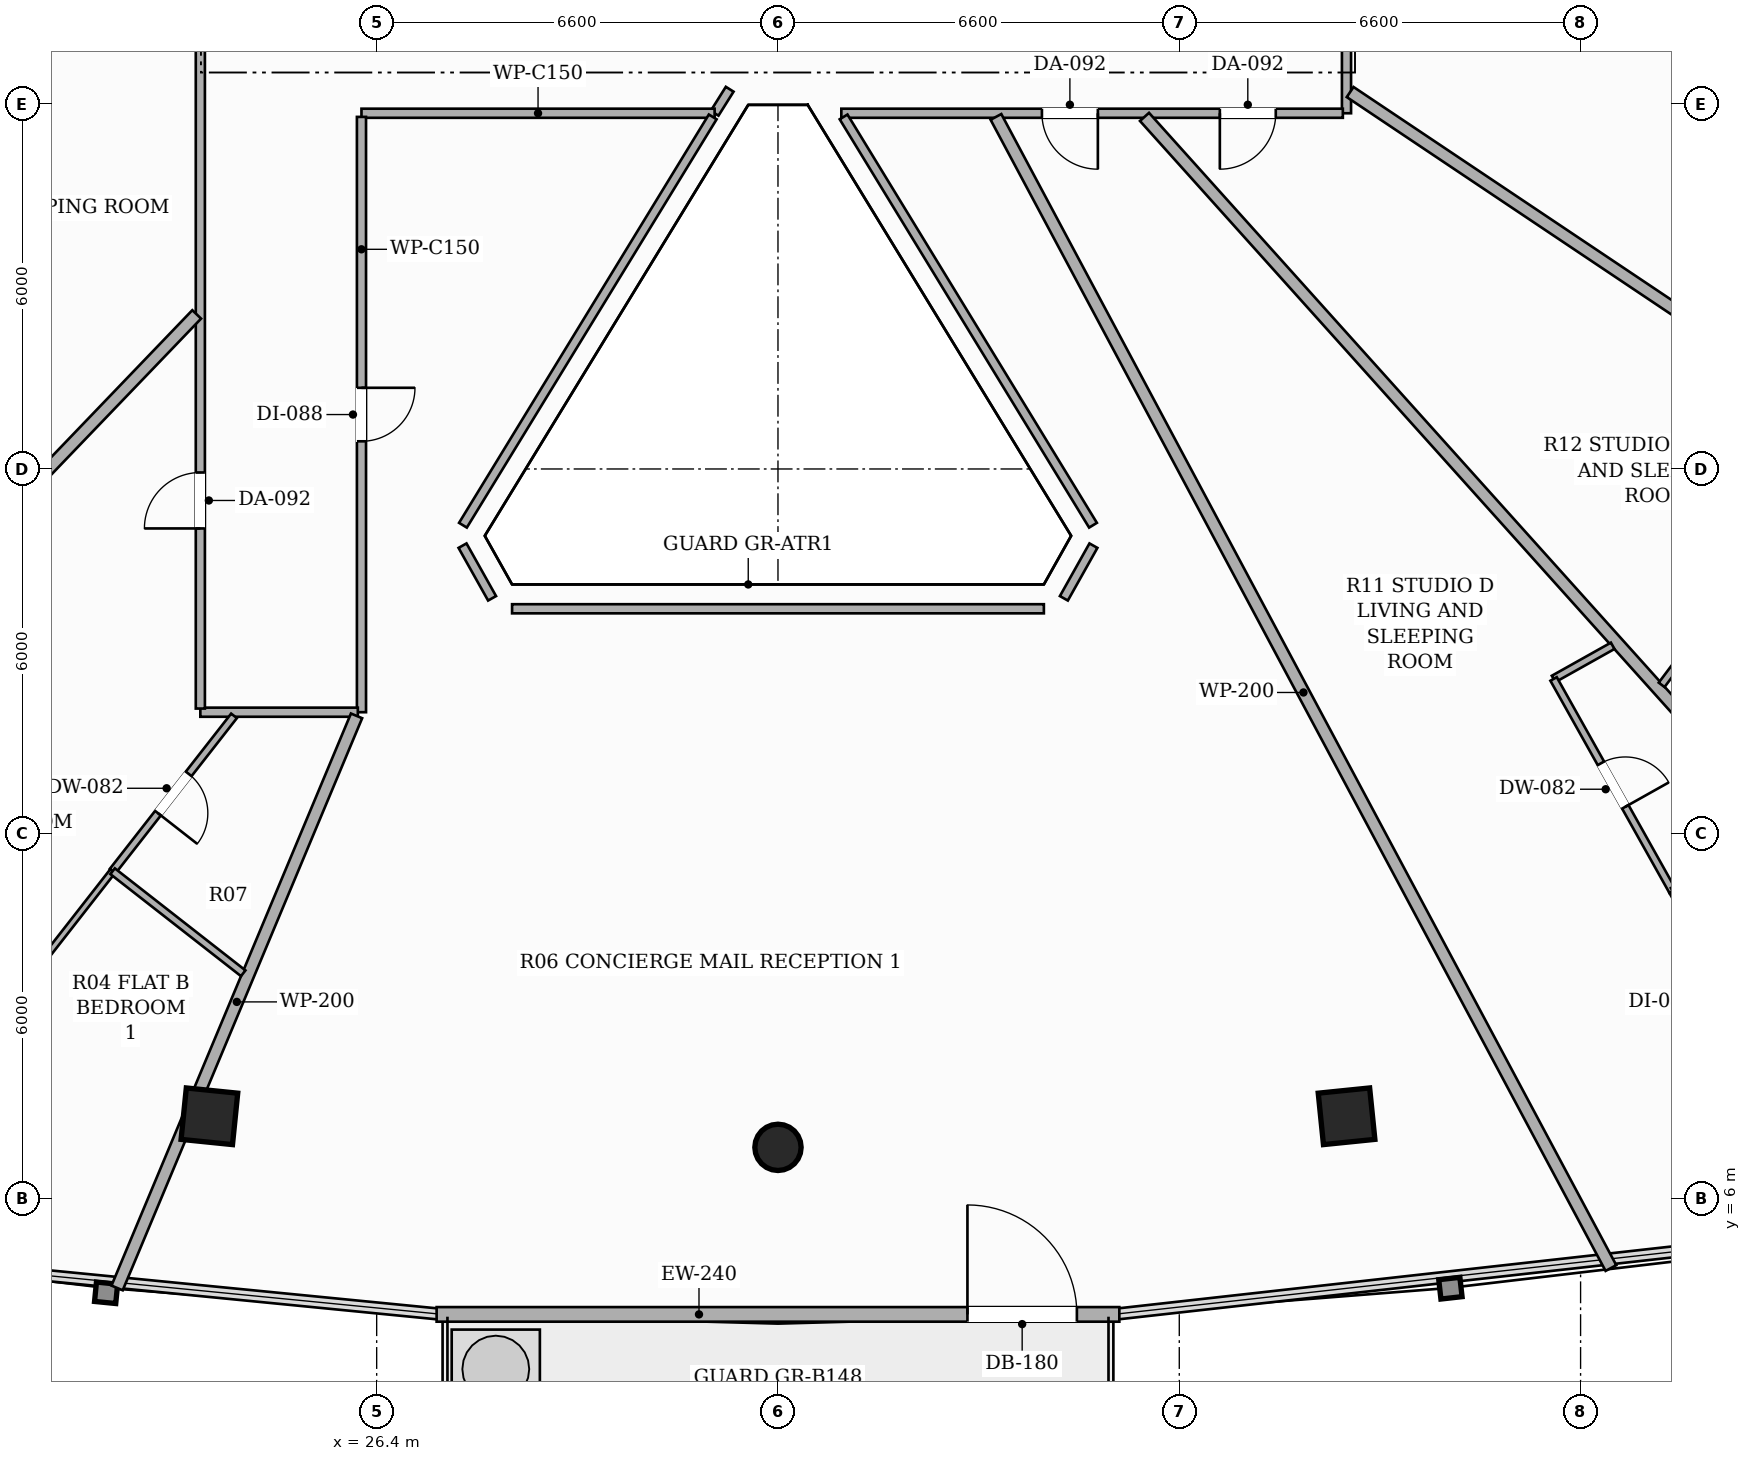
"""IFC4 building model, lengths in metres.
Left out: names, types, materials, properties, quantities, classifications, styles, units other than length and angle.
Written with IfcOpenShell. Run it as: python <this file> out.ifc"""

import sys

from ifc_helpers import new_model, si_unit, direction, frame, frame_2d, origin, origin_2d, place, context, subcontext, project, spatial, rectangle, hollow_rectangle, hollow_circle, extrude, element, fill, save


model = new_model("IFC4")
c1 = context("Model", 3, precision=1e-05, world=origin(), true_north=direction((0.0, 1.0)))
c2 = subcontext(c1, "Body", "Model", "MODEL_VIEW")
j1 = project(units=[si_unit("LENGTHUNIT", "METRE"), si_unit("PLANEANGLEUNIT", "RADIAN")], contexts=[c1])
p1 = place(None, origin())
s1 = spatial("IfcSite", under=j1, at=p1, CompositionType="ELEMENT")
p2 = place(p1, origin())
s2 = spatial("IfcBuilding", under=s1, at=p2, CompositionType="ELEMENT")
p3 = place(p2, frame((0.0, 0.0, 180.35)))
s3 = spatial("IfcBuildingStorey", under=s2, at=p3, CompositionType="ELEMENT", Elevation=180.35)
p4 = place(p3, frame((23.649, 7.355, 0.0), z_axis=(0.0, 0.0, 1.0), x_axis=(-0.994880708829, 0.101056297183, 0.0)))
e1 = element("IfcColumn", 1, at=p4, inside=s3, PredefinedType="COLUMN", context=c2, shape_type="SweptSolid", body=[
    extrude(hollow_rectangle(XDim=0.85, YDim=0.85, WallThickness=0.028, at=origin_2d()), origin(), (0.0, 0.0, 1.0), 3.3),
])
p5 = place(p3, frame((33.0, 6.844, 0.0), z_axis=(0.0, 0.0, 1.0), x_axis=(1.0, 0.0, 0.0)))
e2 = element("IfcColumn", 2, at=p5, inside=s3, PredefinedType="COLUMN", context=c2, shape_type="SweptSolid", body=[
    extrude(hollow_circle(Radius=0.381, WallThickness=0.022, at=origin_2d()), origin(), (0.0, 0.0, 1.0), 3.3),
])
p6 = place(p3, frame((42.351, 7.355, 0.0), z_axis=(0.0, 0.0, 1.0), x_axis=(0.994880708829, 0.101056297183, 0.0)))
e3 = element("IfcColumn", 3, at=p6, inside=s3, PredefinedType="COLUMN", context=c2, shape_type="SweptSolid", body=[
    extrude(hollow_rectangle(XDim=0.85, YDim=0.85, WallThickness=0.028, at=origin_2d()), origin(), (0.0, 0.0, 1.0), 3.3),
])
p7 = place(p3, frame((27.386, 4.097, 0.0), z_axis=(0.0, 0.0, 1.0), x_axis=(1.0, 0.0, 0.0)))
e4 = element("IfcWall", 4, at=p7, inside=s3, PredefinedType="SOLIDWALL", context=c2, shape_type="SweptSolid", body=[
    extrude(rectangle(XDim=11.228, YDim=0.24, at=frame_2d((5.614, 0.0))), origin(), (0.0, 0.0, 1.0), 2.624),
])
p8 = place(p7, frame((8.73, 0.0, 0.0)))
e5 = element("IfcOpeningElement", 5, at=p8, cuts=e4, PredefinedType="OPENING", context=c2, shape_type="SweptSolid", body=[
    extrude(rectangle(XDim=1.8, YDim=2.2, at=frame_2d((0.9, 1.1))), frame((0.0, 0.13, 0.0), z_axis=(0.0, -1.0, 0.0), x_axis=(1.0, 0.0, 0.0)), (0.0, 0.0, 1.0), 0.26),
])
p9 = place(p3, frame((50.652, 24.373, 0.0), z_axis=(0.0, 0.0, 1.0), x_axis=(-0.514290689074, 0.857615932182, 0.0)))
e6 = element("IfcWall", 6, at=p9, inside=s3, PredefinedType="SOLIDWALL", context=c2, shape_type="SweptSolid", body=[
    extrude(rectangle(XDim=10.856, YDim=0.24, at=frame_2d((5.428, 0.0))), origin(), (0.0, 0.0, 1.0), 2.624),
])
p10 = place(p9, frame((8.358, 0.0, 0.0)))
e7 = element("IfcOpeningElement", 7, at=p10, cuts=e6, PredefinedType="OPENING", context=c2, shape_type="SweptSolid", body=[
    extrude(rectangle(XDim=1.8, YDim=2.2, at=frame_2d((0.9, 1.1))), frame((0.0, 0.13, 0.0), z_axis=(0.0, -1.0, 0.0), x_axis=(1.0, 0.0, 0.0)), (0.0, 0.0, 1.0), 0.26),
])
p11 = place(p3, frame((32.206, 24.245, 0.0), z_axis=(0.0, 0.0, 1.0), x_axis=(-0.531785592992, -0.84687902506, 0.0)))
e8 = element("IfcWall", 8, at=p11, inside=s3, PredefinedType="PARTITIONING", context=c2, shape_type="SweptSolid", body=[
    extrude(rectangle(XDim=0.467, YDim=0.15, at=frame_2d((0.233, 0.0))), origin(), (0.0, 0.0, 1.0), 3.06),
])
p12 = place(p3, frame((31.958, 23.85, 0.0), z_axis=(0.0, 0.0, 1.0), x_axis=(-1.0, 0.0, 0.0)))
e9 = element("IfcWall", 9, at=p12, inside=s3, PredefinedType="PARTITIONING", context=c2, shape_type="SweptSolid", body=[
    extrude(rectangle(XDim=5.808, YDim=0.15, at=frame_2d((2.904, 0.0))), origin(), (0.0, 0.0, 1.0), 2.721),
])
p13 = place(p3, frame((26.15, 23.79, 0.0), z_axis=(0.0, 0.0, 1.0), x_axis=(0.0, -1.0, 0.0)))
e10 = element("IfcWall", 10, at=p13, inside=s3, PredefinedType="PARTITIONING", context=c2, shape_type="SweptSolid", body=[
    extrude(rectangle(XDim=9.79, YDim=0.15, at=frame_2d((4.895, 0.0))), origin(), (0.0, 0.0, 1.0), 2.721),
])
p14 = place(p13, frame((4.455, 0.0, 0.0)))
e11 = element("IfcOpeningElement", 11, at=p14, cuts=e10, PredefinedType="OPENING", context=c2, shape_type="SweptSolid", body=[
    extrude(rectangle(XDim=0.88, YDim=2.1, at=frame_2d((0.44, 1.05))), frame((0.0, 0.085, 0.0), z_axis=(0.0, -1.0, 0.0), x_axis=(1.0, 0.0, 0.0)), (0.0, 0.0, 1.0), 0.17),
])
p15 = place(p3, frame((26.09, 14.0, 0.0), z_axis=(0.0, 0.0, 1.0), x_axis=(-1.0, 0.0, 0.0)))
e12 = element("IfcWall", 12, at=p15, inside=s3, PredefinedType="PARTITIONING", context=c2, shape_type="SweptSolid", body=[
    extrude(rectangle(XDim=2.59, YDim=0.15, at=frame_2d((1.295, 0.0))), origin(), (0.0, 0.0, 1.0), 2.721),
])
p16 = place(p3, frame((23.5, 14.06, 0.0), z_axis=(0.0, 0.0, 1.0), x_axis=(0.0, 1.0, 0.0)))
e13 = element("IfcWall", 13, at=p16, inside=s3, PredefinedType="PARTITIONING", context=c2, shape_type="SweptSolid", body=[
    extrude(rectangle(XDim=23.181, YDim=0.15, at=frame_2d((11.59, 0.0))), origin(), (0.0, 0.0, 1.0), 2.413),
])
p17 = place(p16, frame((14.184, 0.0, 0.0)))
e14 = element("IfcOpeningElement", 14, at=p17, cuts=e13, PredefinedType="OPENING", context=c2, shape_type="SweptSolid", body=[
    extrude(rectangle(XDim=0.92, YDim=2.15, at=frame_2d((0.46, 1.075))), frame((0.0, 0.085, 0.0), z_axis=(0.0, -1.0, 0.0), x_axis=(1.0, 0.0, 0.0)), (0.0, 0.0, 1.0), 0.17),
])
p18 = place(p16, frame((2.962, 0.0, 0.0)))
e15 = element("IfcOpeningElement", 15, at=p18, cuts=e13, PredefinedType="OPENING", context=c2, shape_type="SweptSolid", body=[
    extrude(rectangle(XDim=0.92, YDim=2.15, at=frame_2d((0.46, 1.075))), frame((0.0, 0.085, 0.0), z_axis=(0.0, -1.0, 0.0), x_axis=(1.0, 0.0, 0.0)), (0.0, 0.0, 1.0), 0.17),
])
p19 = place(p3, frame((42.35, 28.34, 0.0), z_axis=(0.0, 0.0, 1.0), x_axis=(0.0, -1.0, 0.0)))
e16 = element("IfcWall", 16, at=p19, inside=s3, PredefinedType="PARTITIONING", context=c2, shape_type="SweptSolid", body=[
    extrude(rectangle(XDim=4.49, YDim=0.15, at=frame_2d((2.245, 0.0))), origin(), (0.0, 0.0, 1.0), 2.721),
])
p20 = place(p19, frame((1.783, 0.0, 0.0)))
e17 = element("IfcOpeningElement", 17, at=p20, cuts=e16, PredefinedType="OPENING", context=c2, shape_type="SweptSolid", body=[
    extrude(rectangle(XDim=0.88, YDim=2.1, at=frame_2d((0.44, 1.05))), frame((0.0, 0.085, 0.0), z_axis=(0.0, -1.0, 0.0), x_axis=(1.0, 0.0, 0.0)), (0.0, 0.0, 1.0), 0.17),
])
p21 = place(p3, frame((42.29, 23.85, 0.0), z_axis=(0.0, 0.0, 1.0), x_axis=(-1.0, 0.0, 0.0)))
e18 = element("IfcWall", 18, at=p21, inside=s3, PredefinedType="PARTITIONING", context=c2, shape_type="SweptSolid", body=[
    extrude(rectangle(XDim=8.248, YDim=0.15, at=frame_2d((4.124, 0.0))), origin(), (0.0, 0.0, 1.0), 2.492),
])
p22 = place(p21, frame((1.103, 0.0, 0.0)))
e19 = element("IfcOpeningElement", 19, at=p22, cuts=e18, PredefinedType="OPENING", context=c2, shape_type="SweptSolid", body=[
    extrude(rectangle(XDim=0.92, YDim=2.15, at=frame_2d((0.46, 1.075))), frame((0.0, 0.085, 0.0), z_axis=(0.0, -1.0, 0.0), x_axis=(1.0, 0.0, 0.0)), (0.0, 0.0, 1.0), 0.17),
])
p23 = place(p21, frame((4.029, 0.0, 0.0)))
e20 = element("IfcOpeningElement", 20, at=p23, cuts=e18, PredefinedType="OPENING", context=c2, shape_type="SweptSolid", body=[
    extrude(rectangle(XDim=0.92, YDim=2.15, at=frame_2d((0.46, 1.075))), frame((0.0, 0.085, 0.0), z_axis=(0.0, -1.0, 0.0), x_axis=(1.0, 0.0, 0.0)), (0.0, 0.0, 1.0), 0.17),
])
p24 = place(p3, frame((34.079, 23.79, 0.0), z_axis=(0.0, 0.0, 1.0), x_axis=(0.521278062647, -0.853386888465, 0.0)))
e21 = element("IfcWall", 21, at=p24, inside=s3, PredefinedType="PARTITIONING", context=c2, shape_type="SweptSolid", body=[
    extrude(rectangle(XDim=7.869, YDim=0.15, at=frame_2d((3.934, 0.0))), origin(), (0.0, 0.0, 1.0), 2.721),
])
p25 = place(p3, frame((38.188, 16.739, 0.0), z_axis=(0.0, 0.0, 1.0), x_axis=(-0.489479004575, -0.872015082485, 0.0)))
e22 = element("IfcWall", 22, at=p25, inside=s3, PredefinedType="PARTITIONING", context=c2, shape_type="SweptSolid", body=[
    extrude(rectangle(XDim=0.993, YDim=0.15, at=frame_2d((0.497, 0.0))), origin(), (0.0, 0.0, 1.0), 3.06),
])
p26 = place(p3, frame((37.373, 15.701, 0.0), z_axis=(0.0, 0.0, 1.0), x_axis=(-1.0, 0.0, 0.0)))
e23 = element("IfcWall", 23, at=p26, inside=s3, PredefinedType="PARTITIONING", context=c2, shape_type="SweptSolid", body=[
    extrude(rectangle(XDim=8.746, YDim=0.15, at=frame_2d((4.373, 0.0))), origin(), (0.0, 0.0, 1.0), 2.721),
])
p27 = place(p3, frame((28.298, 15.873, 0.0), z_axis=(0.0, 0.0, 1.0), x_axis=(-0.489479004575, 0.872015082485, 0.0)))
e24 = element("IfcWall", 24, at=p27, inside=s3, PredefinedType="PARTITIONING", context=c2, shape_type="SweptSolid", body=[
    extrude(rectangle(XDim=0.993, YDim=0.15, at=frame_2d((0.497, 0.0))), origin(), (0.0, 0.0, 1.0), 3.06),
])
p28 = place(p3, frame((27.819, 17.075, 0.0), z_axis=(0.0, 0.0, 1.0), x_axis=(0.52184261318, 0.853041785066, 0.0)))
e25 = element("IfcWall", 25, at=p28, inside=s3, PredefinedType="PARTITIONING", context=c2, shape_type="SweptSolid", body=[
    extrude(rectangle(XDim=7.872, YDim=0.15, at=frame_2d((3.936, 0.0))), origin(), (0.0, 0.0, 1.0), 2.721),
])
p29 = place(p3, frame((22.131, 4.532, 0.0), z_axis=(0.0, 0.0, 1.0), x_axis=(0.38611914038, 0.922448919687, 0.0)))
e26 = element("IfcWall", 26, at=p29, inside=s3, PredefinedType="PARTITIONING", context=c2, shape_type="SweptSolid", body=[
    extrude(rectangle(XDim=10.199, YDim=0.2, at=frame_2d((5.1, 0.0))), origin(), (0.0, 0.0, 1.0), 2.413),
])
p30 = place(p3, frame((36.585, 23.79, 0.0), z_axis=(0.0, 0.0, 1.0), x_axis=(0.47121923303, -0.88201611914, 0.0)))
e27 = element("IfcWall", 27, at=p30, inside=s3, PredefinedType="PARTITIONING", context=c2, shape_type="SweptSolid", body=[
    extrude(rectangle(XDim=21.463, YDim=0.2, at=frame_2d((10.732, 0.0))), origin(), (0.0, 0.0, 1.0), 2.413),
])
p31 = place(p3, frame((54.571, 16.055, 0.0), z_axis=(0.0, 0.0, 1.0), x_axis=(-0.830893680957, 0.556431209535, 0.0)))
e28 = element("IfcWall", 28, at=p31, inside=s3, PredefinedType="PARTITIONING", context=c2, shape_type="SweptSolid", body=[
    extrude(rectangle(XDim=14.636, YDim=0.2, at=frame_2d((7.318, 0.0))), origin(), (0.0, 0.0, 1.0), 2.413),
])
p32 = place(p3, frame((23.44, 20.542, 0.0), z_axis=(0.0, 0.0, 1.0), x_axis=(-0.692558302481, -0.721361904777, 0.0)))
e29 = element("IfcWall", 29, at=p32, inside=s3, PredefinedType="PARTITIONING", context=c2, shape_type="SweptSolid", body=[
    extrude(rectangle(XDim=19.58, YDim=0.2, at=frame_2d((9.79, 0.0))), origin(), (0.0, 0.0, 1.0), 2.413),
])
p33 = place(p3, frame((55.049, 5.957, 0.0), z_axis=(0.0, 0.0, 1.0), x_axis=(-0.668302779631, 0.743889369958, 0.0)))
e30 = element("IfcWall", 30, at=p33, inside=s3, PredefinedType="PARTITIONING", context=c2, shape_type="SweptSolid", body=[
    extrude(rectangle(XDim=23.973, YDim=0.2, at=frame_2d((11.986, 0.0))), origin(), (0.0, 0.0, 1.0), 2.413),
])
p34 = place(p3, frame((24.054, 13.94, 0.0), z_axis=(0.0, 0.0, 1.0), x_axis=(-0.615841255229, -0.787870261121, 0.0)))
e31 = element("IfcWall", 31, at=p34, inside=s3, PredefinedType="PARTITIONING", context=c2, shape_type="SweptSolid", body=[
    extrude(rectangle(XDim=3.243, YDim=0.12, at=frame_2d((1.622, 0.0))), origin(), (0.0, 0.0, 1.0), 2.721),
])
p35 = place(p34, frame((1.211, 0.0, 0.0)))
e32 = element("IfcOpeningElement", 32, at=p35, cuts=e31, PredefinedType="OPENING", context=c2, shape_type="SweptSolid", body=[
    extrude(rectangle(XDim=0.82, YDim=2.1, at=frame_2d((0.41, 1.05))), frame((0.0, 0.07, 0.0), z_axis=(0.0, -1.0, 0.0), x_axis=(1.0, 0.0, 0.0)), (0.0, 0.0, 1.0), 0.14),
])
p36 = place(p3, frame((22.057, 11.385, 0.0), z_axis=(0.0, 0.0, 1.0), x_axis=(-0.61561191154, -0.78804947457, 0.0)))
e33 = element("IfcWall", 33, at=p36, inside=s3, PredefinedType="PARTITIONING", context=c2, shape_type="SweptSolid", body=[
    extrude(rectangle(XDim=7.963, YDim=0.1, at=frame_2d((3.981, 0.0))), origin(), (0.0, 0.0, 1.0), 2.413),
])
p37 = place(p36, frame((3.541, 0.0, 0.0)))
e34 = element("IfcOpeningElement", 34, at=p37, cuts=e33, PredefinedType="OPENING", context=c2, shape_type="SweptSolid", body=[
    extrude(rectangle(XDim=0.88, YDim=2.1, at=frame_2d((0.44, 1.05))), frame((0.0, 0.06, 0.0), z_axis=(0.0, -1.0, 0.0), x_axis=(1.0, 0.0, 0.0)), (0.0, 0.0, 1.0), 0.12),
])
p38 = place(p3, frame((24.205, 9.707, 0.0), z_axis=(0.0, 0.0, 1.0), x_axis=(-0.788077327334, 0.615576255343, 0.0)))
e35 = element("IfcWall", 35, at=p38, inside=s3, PredefinedType="PARTITIONING", context=c2, shape_type="SweptSolid", body=[
    extrude(rectangle(XDim=2.726, YDim=0.12, at=frame_2d((1.363, 0.0))), origin(), (0.0, 0.0, 1.0), 2.721),
])
p39 = place(p3, frame((48.562, 15.819, 0.0), z_axis=(0.0, 0.0, 1.0), x_axis=(-0.600820734403, -0.799383790874, 0.0)))
e36 = element("IfcWall", 36, at=p39, inside=s3, PredefinedType="PARTITIONING", context=c2, shape_type="SweptSolid", body=[
    extrude(rectangle(XDim=1.713, YDim=0.12, at=frame_2d((0.856, 0.0))), origin(), (0.0, 0.0, 1.0), 2.492),
])
p40 = place(p3, frame((46.728, 15.092, 0.0), z_axis=(0.0, 0.0, 1.0), x_axis=(-0.872259310975, -0.489043652875, 0.0)))
e37 = element("IfcWall", 37, at=p40, inside=s3, PredefinedType="PARTITIONING", context=c2, shape_type="SweptSolid", body=[
    extrude(rectangle(XDim=1.114, YDim=0.12, at=frame_2d((0.557, 0.0))), origin(), (0.0, 0.0, 1.0), 3.06),
])
p41 = place(p3, frame((45.756, 14.547, 0.0), z_axis=(0.0, 0.0, 1.0), x_axis=(0.489160448732, -0.872193817564, 0.0)))
e38 = element("IfcWall", 38, at=p41, inside=s3, PredefinedType="PARTITIONING", context=c2, shape_type="SweptSolid", body=[
    extrude(rectangle(XDim=4.003, YDim=0.12, at=frame_2d((2.001, 0.0))), origin(), (0.0, 0.0, 1.0), 3.06),
])
p42 = place(p41, frame((1.591, 0.0, 0.0)))
e39 = element("IfcOpeningElement", 39, at=p42, cuts=e38, PredefinedType="OPENING", context=c2, shape_type="SweptSolid", body=[
    extrude(rectangle(XDim=0.82, YDim=2.1, at=frame_2d((0.41, 1.05))), frame((0.0, 0.07, 0.0), z_axis=(0.0, -1.0, 0.0), x_axis=(1.0, 0.0, 0.0)), (0.0, 0.0, 1.0), 0.14),
])
p43 = place(p3, frame((47.714, 11.056, 0.0), z_axis=(0.0, 0.0, 1.0), x_axis=(0.489058521283, -0.87225097464, 0.0)))
e40 = element("IfcWall", 40, at=p43, inside=s3, PredefinedType="PARTITIONING", context=c2, shape_type="SweptSolid", body=[
    extrude(rectangle(XDim=4.001, YDim=0.12, at=frame_2d((2.0, 0.0))), origin(), (0.0, 0.0, 1.0), 2.413),
])
p44 = place(p43, frame((1.561, 0.0, 0.0)))
e41 = element("IfcOpeningElement", 41, at=p44, cuts=e40, PredefinedType="OPENING", context=c2, shape_type="SweptSolid", body=[
    extrude(rectangle(XDim=0.88, YDim=2.1, at=frame_2d((0.44, 1.05))), frame((0.0, 0.07, 0.0), z_axis=(0.0, -1.0, 0.0), x_axis=(1.0, 0.0, 0.0)), (0.0, 0.0, 1.0), 0.14),
])
p45 = place(p3, frame((49.469, 12.041, 0.0), z_axis=(0.0, 0.0, 1.0), x_axis=(-0.872002863311, -0.489500772602, 0.0)))
e42 = element("IfcWall", 42, at=p45, inside=s3, PredefinedType="PARTITIONING", context=c2, shape_type="SweptSolid", body=[
    extrude(rectangle(XDim=2.012, YDim=0.12, at=frame_2d((1.006, 0.0))), origin(), (0.0, 0.0, 1.0), 3.06),
])
p46 = place(p8, origin())
e43 = element("IfcDoor", 43, at=p46, inside=s3, OperationType="SINGLE_SWING_LEFT", PredefinedType="DOOR", context=c2, shape_type="SweptSolid", body=[
    extrude(rectangle(XDim=1.8, YDim=2.2, at=frame_2d((0.9, 1.1))), frame((0.0, 0.025, 0.0), z_axis=(0.0, -1.0, 0.0), x_axis=(1.0, 0.0, 0.0)), (0.0, 0.0, 1.0), 0.05),
])
fill(e5, e43)
p47 = place(p14, origin())
e44 = element("IfcDoor", 44, at=p47, inside=s3, OperationType="SINGLE_SWING_LEFT", PredefinedType="DOOR", context=c2, shape_type="SweptSolid", body=[
    extrude(rectangle(XDim=0.88, YDim=2.1, at=frame_2d((0.44, 1.05))), frame((0.0, 0.025, 0.0), z_axis=(0.0, -1.0, 0.0), x_axis=(1.0, 0.0, 0.0)), (0.0, 0.0, 1.0), 0.05),
])
fill(e11, e44)
p48 = place(p18, origin())
e45 = element("IfcDoor", 45, at=p48, inside=s3, OperationType="SINGLE_SWING_LEFT", PredefinedType="DOOR", context=c2, shape_type="SweptSolid", body=[
    extrude(rectangle(XDim=0.92, YDim=2.15, at=frame_2d((0.46, 1.075))), frame((0.0, 0.025, 0.0), z_axis=(0.0, -1.0, 0.0), x_axis=(1.0, 0.0, 0.0)), (0.0, 0.0, 1.0), 0.05),
])
fill(e15, e45)
p49 = place(p35, origin())
e46 = element("IfcDoor", 46, at=p49, inside=s3, OperationType="SINGLE_SWING_RIGHT", PredefinedType="DOOR", context=c2, shape_type="SweptSolid", body=[
    extrude(rectangle(XDim=0.82, YDim=2.1, at=frame_2d((0.41, 1.05))), frame((0.0, 0.025, 0.0), z_axis=(0.0, -1.0, 0.0), x_axis=(1.0, 0.0, 0.0)), (0.0, 0.0, 1.0), 0.05),
])
fill(e32, e46)
p50 = place(p22, origin())
e47 = element("IfcDoor", 47, at=p50, inside=s3, OperationType="SINGLE_SWING_RIGHT", PredefinedType="DOOR", context=c2, shape_type="SweptSolid", body=[
    extrude(rectangle(XDim=0.92, YDim=2.15, at=frame_2d((0.46, 1.075))), frame((0.0, 0.025, 0.0), z_axis=(0.0, -1.0, 0.0), x_axis=(1.0, 0.0, 0.0)), (0.0, 0.0, 1.0), 0.05),
])
fill(e19, e47)
p51 = place(p23, origin())
e48 = element("IfcDoor", 48, at=p51, inside=s3, OperationType="SINGLE_SWING_LEFT", PredefinedType="DOOR", context=c2, shape_type="SweptSolid", body=[
    extrude(rectangle(XDim=0.92, YDim=2.15, at=frame_2d((0.46, 1.075))), frame((0.0, 0.025, 0.0), z_axis=(0.0, -1.0, 0.0), x_axis=(1.0, 0.0, 0.0)), (0.0, 0.0, 1.0), 0.05),
])
fill(e20, e48)
p52 = place(p42, origin())
e49 = element("IfcDoor", 49, at=p52, inside=s3, OperationType="SINGLE_SWING_RIGHT", PredefinedType="DOOR", context=c2, shape_type="SweptSolid", body=[
    extrude(rectangle(XDim=0.82, YDim=2.1, at=frame_2d((0.41, 1.05))), frame((0.0, 0.025, 0.0), z_axis=(0.0, -1.0, 0.0), x_axis=(1.0, 0.0, 0.0)), (0.0, 0.0, 1.0), 0.05),
])
fill(e39, e49)
save(model, sys.argv[1])
